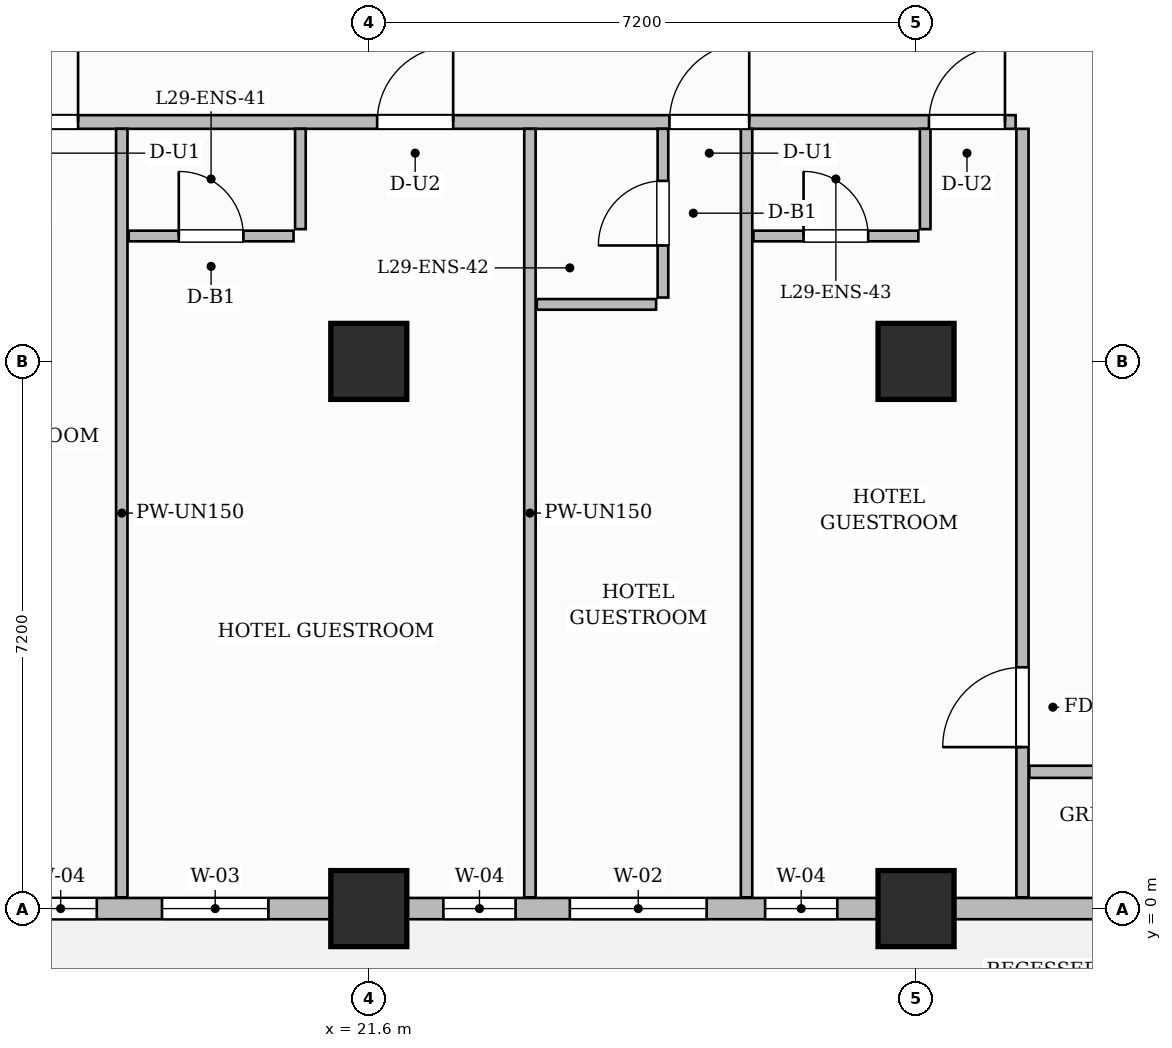
"""IFC4 building model, lengths in metres.
Left out: names, types, materials, properties, quantities, classifications, styles, units other than length and angle.
Written with IfcOpenShell. Run it as: python <this file> out.ifc"""

import sys

from ifc_helpers import new_model, si_unit, direction, frame, frame_2d, origin, origin_2d, place, context, subcontext, project, spatial, rectangle, extrude, source, transform, mapped, element, fill, save


model = new_model("IFC4")
c1 = context("Model", 3, precision=1e-05, world=origin(), true_north=direction((0.0, 1.0)))
c2 = subcontext(c1, "Body", "Model", "MODEL_VIEW")
j1 = project(units=[si_unit("LENGTHUNIT", "METRE"), si_unit("PLANEANGLEUNIT", "RADIAN")], contexts=[c1])
p1 = place(None, origin())
s1 = spatial("IfcSite", under=j1, at=p1, CompositionType="ELEMENT")
p2 = place(p1, origin())
s2 = spatial("IfcBuilding", under=s1, at=p2, CompositionType="ELEMENT")
p3 = place(p2, frame((0.0, 0.0, 119.2)))
s3 = spatial("IfcBuildingStorey", under=s2, at=p3, CompositionType="ELEMENT", Elevation=119.2)
m1 = source(origin(), c2, "Body", "SweptSolid", [
    extrude(rectangle(XDim=1.0, YDim=1.0, at=origin_2d()), origin(), (0.0, 0.0, 1.0), 3.7),
])
for number, where, z_axis, x_axis in (
    (1, (21.6, 0.0, 0.0), (0.0, 0.0, 1.0), (1.0, 0.0, 0.0)),
    (2, (21.6, 7.2, 0.0), (0.0, 0.0, 1.0), (1.0, 0.0, 0.0)),
    (3, (28.8, 0.0, 0.0), (0.0, 0.0, 1.0), (1.0, 0.0, 0.0)),
    (4, (28.8, 7.2, 0.0), (0.0, 0.0, 1.0), (1.0, 0.0, 0.0)),
):
    element("IfcColumn", number, at=place(p3, frame(where, z_axis=z_axis, x_axis=x_axis)), inside=s3, PredefinedType="COLUMN", context=c2, shape_type="MappedRepresentation", body=[
        mapped(m1, transform((0.0, 0.0, 0.0), scale=1.0)),
    ])
p4 = place(p3, frame((14.548, 10.35, 0.0), z_axis=(0.0, 0.0, 1.0), x_axis=(1.0, 0.0, 0.0)))
e5 = element("IfcWall", 5, at=p4, inside=s3, PredefinedType="PARTITIONING", context=c2, shape_type="SweptSolid", body=[
    extrude(rectangle(XDim=15.562, YDim=0.18, at=frame_2d((7.781, 0.0))), origin(), (0.0, 0.0, 1.0), 3.45),
])
p5 = place(p4, frame((2.177, 0.0, 0.0)))
e6 = element("IfcOpeningElement", 6, at=p5, cuts=e5, PredefinedType="OPENING", context=c2, shape_type="SweptSolid", body=[
    extrude(rectangle(XDim=1.05, YDim=2.25, at=frame_2d((0.525, 1.125))), frame((0.0, 0.1, 0.0), z_axis=(0.0, -1.0, 0.0), x_axis=(1.0, 0.0, 0.0)), (0.0, 0.0, 1.0), 0.2),
])
p6 = place(p4, frame((7.162, 0.0, 0.0)))
e7 = element("IfcOpeningElement", 7, at=p6, cuts=e5, PredefinedType="OPENING", context=c2, shape_type="SweptSolid", body=[
    extrude(rectangle(XDim=1.0, YDim=2.2, at=frame_2d((0.5, 1.1))), frame((0.0, 0.1, 0.0), z_axis=(0.0, -1.0, 0.0), x_axis=(1.0, 0.0, 0.0)), (0.0, 0.0, 1.0), 0.2),
])
p7 = place(p4, frame((11.007, 0.0, 0.0)))
e8 = element("IfcOpeningElement", 8, at=p7, cuts=e5, PredefinedType="OPENING", context=c2, shape_type="SweptSolid", body=[
    extrude(rectangle(XDim=1.05, YDim=2.25, at=frame_2d((0.525, 1.125))), frame((0.0, 0.1, 0.0), z_axis=(0.0, -1.0, 0.0), x_axis=(1.0, 0.0, 0.0)), (0.0, 0.0, 1.0), 0.2),
])
p8 = place(p4, frame((14.422, 0.0, 0.0)))
e9 = element("IfcOpeningElement", 9, at=p8, cuts=e5, PredefinedType="OPENING", context=c2, shape_type="SweptSolid", body=[
    extrude(rectangle(XDim=1.0, YDim=2.2, at=frame_2d((0.5, 1.1))), frame((0.0, 0.1, 0.0), z_axis=(0.0, -1.0, 0.0), x_axis=(1.0, 0.0, 0.0)), (0.0, 0.0, 1.0), 0.2),
])
p9 = place(p3, frame((30.2, 0.148, 0.0), z_axis=(0.0, 0.0, 1.0), x_axis=(0.0, 1.0, 0.0)))
e10 = element("IfcWall", 10, at=p9, inside=s3, PredefinedType="PARTITIONING", context=c2, shape_type="SweptSolid", body=[
    extrude(rectangle(XDim=10.112, YDim=0.16, at=frame_2d((5.056, 0.0))), origin(), (0.0, 0.0, 1.0), 3.45),
])
p10 = place(p9, frame((1.977, 0.0, 0.0)))
e11 = element("IfcOpeningElement", 11, at=p10, cuts=e10, PredefinedType="OPENING", context=c2, shape_type="SweptSolid", body=[
    extrude(rectangle(XDim=1.05, YDim=2.15, at=frame_2d((0.525, 1.075))), frame((0.0, 0.09, 0.0), z_axis=(0.0, -1.0, 0.0), x_axis=(1.0, 0.0, 0.0)), (0.0, 0.0, 1.0), 0.18),
])
p11 = place(p3, frame((30.29, 1.8, 0.0), z_axis=(0.0, 0.0, 1.0), x_axis=(1.0, 0.0, 0.0)))
e12 = element("IfcWall", 12, at=p11, inside=s3, PredefinedType="PARTITIONING", context=c2, shape_type="SweptSolid", body=[
    extrude(rectangle(XDim=19.37, YDim=0.16, at=frame_2d((9.685, 0.0))), origin(), (0.0, 0.0, 1.0), 3.45),
])
p12 = place(p11, frame((9.735, 0.0, 0.0)))
e13 = element("IfcOpeningElement", 13, at=p12, cuts=e12, PredefinedType="OPENING", context=c2, shape_type="SweptSolid", body=[
    extrude(rectangle(XDim=0.95, YDim=2.15, at=frame_2d((0.475, 1.075))), frame((0.0, 0.09, 0.0), z_axis=(0.0, -1.0, 0.0), x_axis=(1.0, 0.0, 0.0)), (0.0, 0.0, 1.0), 0.18),
])
p13 = place(p3, frame((18.35, 0.148, 0.0), z_axis=(0.0, 0.0, 1.0), x_axis=(0.0, 1.0, 0.0)))
e14 = element("IfcWall", 14, at=p13, inside=s3, PredefinedType="PARTITIONING", context=c2, shape_type="SweptSolid", body=[
    extrude(rectangle(XDim=10.112, YDim=0.15, at=frame_2d((5.056, 0.0))), origin(), (0.0, 0.0, 1.0), 3.45),
])
p14 = place(p3, frame((20.7, 8.94, 0.0), z_axis=(0.0, 0.0, 1.0), x_axis=(0.0, 1.0, 0.0)))
e15 = element("IfcWall", 15, at=p14, inside=s3, PredefinedType="PARTITIONING", context=c2, shape_type="SweptSolid", body=[
    extrude(rectangle(XDim=1.32, YDim=0.14, at=frame_2d((0.66, 0.0))), origin(), (0.0, 0.0, 1.0), 3.45),
])
p15 = place(p3, frame((18.44, 8.85, 0.0), z_axis=(0.0, 0.0, 1.0), x_axis=(1.0, 0.0, 0.0)))
e16 = element("IfcWall", 16, at=p15, inside=s3, PredefinedType="PARTITIONING", context=c2, shape_type="SweptSolid", body=[
    extrude(rectangle(XDim=2.17, YDim=0.14, at=frame_2d((1.085, 0.0))), origin(), (0.0, 0.0, 1.0), 3.45),
])
p16 = place(p15, frame((0.66, 0.0, 0.0)))
e17 = element("IfcOpeningElement", 17, at=p16, cuts=e16, PredefinedType="OPENING", context=c2, shape_type="SweptSolid", body=[
    extrude(rectangle(XDim=0.85, YDim=2.1, at=frame_2d((0.425, 1.05))), frame((0.0, 0.08, 0.0), z_axis=(0.0, -1.0, 0.0), x_axis=(1.0, 0.0, 0.0)), (0.0, 0.0, 1.0), 0.16),
])
p17 = place(p3, frame((23.72, 0.148, 0.0), z_axis=(0.0, 0.0, 1.0), x_axis=(0.0, 1.0, 0.0)))
e18 = element("IfcWall", 18, at=p17, inside=s3, PredefinedType="PARTITIONING", context=c2, shape_type="SweptSolid", body=[
    extrude(rectangle(XDim=10.112, YDim=0.15, at=frame_2d((5.056, 0.0))), origin(), (0.0, 0.0, 1.0), 3.45),
])
p18 = place(p3, frame((25.47, 8.04, 0.0), z_axis=(0.0, 0.0, 1.0), x_axis=(0.0, 1.0, 0.0)))
e19 = element("IfcWall", 19, at=p18, inside=s3, PredefinedType="PARTITIONING", context=c2, shape_type="SweptSolid", body=[
    extrude(rectangle(XDim=2.22, YDim=0.14, at=frame_2d((1.11, 0.0))), origin(), (0.0, 0.0, 1.0), 3.45),
])
p19 = place(p18, frame((0.685, 0.0, 0.0)))
e20 = element("IfcOpeningElement", 20, at=p19, cuts=e19, PredefinedType="OPENING", context=c2, shape_type="SweptSolid", body=[
    extrude(rectangle(XDim=0.85, YDim=2.1, at=frame_2d((0.425, 1.05))), frame((0.0, 0.08, 0.0), z_axis=(0.0, -1.0, 0.0), x_axis=(1.0, 0.0, 0.0)), (0.0, 0.0, 1.0), 0.16),
])
p20 = place(p3, frame((23.81, 7.95, 0.0), z_axis=(0.0, 0.0, 1.0), x_axis=(1.0, 0.0, 0.0)))
e21 = element("IfcWall", 21, at=p20, inside=s3, PredefinedType="PARTITIONING", context=c2, shape_type="SweptSolid", body=[
    extrude(rectangle(XDim=1.57, YDim=0.14, at=frame_2d((0.785, 0.0))), origin(), (0.0, 0.0, 1.0), 3.45),
])
p21 = place(p3, frame((26.57, 0.148, 0.0), z_axis=(0.0, 0.0, 1.0), x_axis=(0.0, 1.0, 0.0)))
e22 = element("IfcWall", 22, at=p21, inside=s3, PredefinedType="PARTITIONING", context=c2, shape_type="SweptSolid", body=[
    extrude(rectangle(XDim=10.112, YDim=0.15, at=frame_2d((5.056, 0.0))), origin(), (0.0, 0.0, 1.0), 3.45),
])
p22 = place(p3, frame((28.92, 8.94, 0.0), z_axis=(0.0, 0.0, 1.0), x_axis=(0.0, 1.0, 0.0)))
e23 = element("IfcWall", 23, at=p22, inside=s3, PredefinedType="PARTITIONING", context=c2, shape_type="SweptSolid", body=[
    extrude(rectangle(XDim=1.32, YDim=0.14, at=frame_2d((0.66, 0.0))), origin(), (0.0, 0.0, 1.0), 2.935),
])
p23 = place(p3, frame((26.66, 8.85, 0.0), z_axis=(0.0, 0.0, 1.0), x_axis=(1.0, 0.0, 0.0)))
e24 = element("IfcWall", 24, at=p23, inside=s3, PredefinedType="PARTITIONING", context=c2, shape_type="SweptSolid", body=[
    extrude(rectangle(XDim=2.17, YDim=0.14, at=frame_2d((1.085, 0.0))), origin(), (0.0, 0.0, 1.0), 3.45),
])
p24 = place(p23, frame((0.66, 0.0, 0.0)))
e25 = element("IfcOpeningElement", 25, at=p24, cuts=e24, PredefinedType="OPENING", context=c2, shape_type="SweptSolid", body=[
    extrude(rectangle(XDim=0.85, YDim=2.1, at=frame_2d((0.425, 1.05))), frame((0.0, 0.08, 0.0), z_axis=(0.0, -1.0, 0.0), x_axis=(1.0, 0.0, 0.0)), (0.0, 0.0, 1.0), 0.16),
])
p25 = place(p3, frame((14.4, 0.0, 0.0), z_axis=(0.0, 0.0, 1.0), x_axis=(1.0, 0.0, 0.0)))
e26 = element("IfcWall", 26, at=p25, inside=s3, PredefinedType="SOLIDWALL", context=c2, shape_type="SweptSolid", body=[
    extrude(rectangle(XDim=35.4, YDim=0.28, at=frame_2d((17.7, 0.0))), origin(), (0.0, 0.0, 1.0), 2.935),
])
p26 = place(p25, frame((0.85, 0.0, 0.0)))
e27 = element("IfcOpeningElement", 27, at=p26, cuts=e26, PredefinedType="OPENING", context=c2, shape_type="SweptSolid", body=[
    extrude(rectangle(XDim=1.2, YDim=2.2, at=frame_2d((0.6, 1.1))), frame((0.0, 0.15, 0.0), z_axis=(0.0, -1.0, 0.0), x_axis=(1.0, 0.0, 0.0)), (0.0, 0.0, 1.0), 0.3),
])
p27 = place(p25, frame((2.671, 0.0, 0.8)))
e28 = element("IfcOpeningElement", 28, at=p27, cuts=e26, PredefinedType="OPENING", context=c2, shape_type="SweptSolid", body=[
    extrude(rectangle(XDim=0.95, YDim=1.75, at=frame_2d((0.475, 0.875))), frame((0.0, 0.15, 0.0), z_axis=(0.0, -1.0, 0.0), x_axis=(1.0, 0.0, 0.0)), (0.0, 0.0, 1.0), 0.3),
])
p28 = place(p25, frame((4.479, 0.0, 0.8)))
e29 = element("IfcOpeningElement", 29, at=p28, cuts=e26, PredefinedType="OPENING", context=c2, shape_type="SweptSolid", body=[
    extrude(rectangle(XDim=1.4, YDim=1.85, at=frame_2d((0.7, 0.925))), frame((0.0, 0.15, 0.0), z_axis=(0.0, -1.0, 0.0), x_axis=(1.0, 0.0, 0.0)), (0.0, 0.0, 1.0), 0.3),
])
p29 = place(p25, frame((8.181, 0.0, 0.8)))
e30 = element("IfcOpeningElement", 30, at=p29, cuts=e26, PredefinedType="OPENING", context=c2, shape_type="SweptSolid", body=[
    extrude(rectangle(XDim=0.95, YDim=1.75, at=frame_2d((0.475, 0.875))), frame((0.0, 0.15, 0.0), z_axis=(0.0, -1.0, 0.0), x_axis=(1.0, 0.0, 0.0)), (0.0, 0.0, 1.0), 0.3),
])
p30 = place(p25, frame((9.845, 0.0, 0.8)))
e31 = element("IfcOpeningElement", 31, at=p30, cuts=e26, PredefinedType="OPENING", context=c2, shape_type="SweptSolid", body=[
    extrude(rectangle(XDim=1.8, YDim=1.85, at=frame_2d((0.9, 0.925))), frame((0.0, 0.15, 0.0), z_axis=(0.0, -1.0, 0.0), x_axis=(1.0, 0.0, 0.0)), (0.0, 0.0, 1.0), 0.3),
])
p31 = place(p25, frame((12.414, 0.0, 0.8)))
e32 = element("IfcOpeningElement", 32, at=p31, cuts=e26, PredefinedType="OPENING", context=c2, shape_type="SweptSolid", body=[
    extrude(rectangle(XDim=0.95, YDim=1.75, at=frame_2d((0.475, 0.875))), frame((0.0, 0.15, 0.0), z_axis=(0.0, -1.0, 0.0), x_axis=(1.0, 0.0, 0.0)), (0.0, 0.0, 1.0), 0.3),
])
p32 = place(p25, frame((16.804, 0.0, 0.8)))
e33 = element("IfcOpeningElement", 33, at=p32, cuts=e26, PredefinedType="OPENING", context=c2, shape_type="SweptSolid", body=[
    extrude(rectangle(XDim=1.8, YDim=1.85, at=frame_2d((0.9, 0.925))), frame((0.0, 0.15, 0.0), z_axis=(0.0, -1.0, 0.0), x_axis=(1.0, 0.0, 0.0)), (0.0, 0.0, 1.0), 0.3),
])
p33 = place(p25, frame((21.725, 0.0, 0.8)))
e34 = element("IfcOpeningElement", 34, at=p33, cuts=e26, PredefinedType="OPENING", context=c2, shape_type="SweptSolid", body=[
    extrude(rectangle(XDim=1.8, YDim=1.85, at=frame_2d((0.9, 0.925))), frame((0.0, 0.15, 0.0), z_axis=(0.0, -1.0, 0.0), x_axis=(1.0, 0.0, 0.0)), (0.0, 0.0, 1.0), 0.3),
])
p34 = place(p25, frame((24.475, 0.0, 0.8)))
e35 = element("IfcOpeningElement", 35, at=p34, cuts=e26, PredefinedType="OPENING", context=c2, shape_type="SweptSolid", body=[
    extrude(rectangle(XDim=1.8, YDim=1.85, at=frame_2d((0.9, 0.925))), frame((0.0, 0.15, 0.0), z_axis=(0.0, -1.0, 0.0), x_axis=(1.0, 0.0, 0.0)), (0.0, 0.0, 1.0), 0.3),
])
p35 = place(p25, frame((29.075, 0.0, 0.8)))
e36 = element("IfcOpeningElement", 36, at=p35, cuts=e26, PredefinedType="OPENING", context=c2, shape_type="SweptSolid", body=[
    extrude(rectangle(XDim=1.8, YDim=1.85, at=frame_2d((0.9, 0.925))), frame((0.0, 0.15, 0.0), z_axis=(0.0, -1.0, 0.0), x_axis=(1.0, 0.0, 0.0)), (0.0, 0.0, 1.0), 0.3),
])
p36 = place(p25, frame((32.125, 0.0, 0.8)))
e37 = element("IfcOpeningElement", 37, at=p36, cuts=e26, PredefinedType="OPENING", context=c2, shape_type="SweptSolid", body=[
    extrude(rectangle(XDim=1.8, YDim=1.85, at=frame_2d((0.9, 0.925))), frame((0.0, 0.15, 0.0), z_axis=(0.0, -1.0, 0.0), x_axis=(1.0, 0.0, 0.0)), (0.0, 0.0, 1.0), 0.3),
])
m2 = source(origin(), c2, "Body", "SweptSolid", [
    extrude(rectangle(XDim=1.05, YDim=2.15, at=frame_2d((0.525, 1.075))), frame((0.0, 0.025, 0.0), z_axis=(0.0, -1.0, 0.0), x_axis=(1.0, 0.0, 0.0)), (0.0, 0.0, 1.0), 0.05),
])
p37 = place(p10, origin())
e38 = element("IfcDoor", 38, at=p37, inside=s3, OperationType="SINGLE_SWING_LEFT", PredefinedType="DOOR", context=c2, shape_type="MappedRepresentation", body=[
    mapped(m2, transform((0.0, 0.0, 0.0), scale=1.0)),
])
fill(e11, e38)
m3 = source(origin(), c2, "Body", "SweptSolid", [
    extrude(rectangle(XDim=1.05, YDim=2.25, at=frame_2d((0.525, 1.125))), frame((0.0, 0.025, 0.0), z_axis=(0.0, -1.0, 0.0), x_axis=(1.0, 0.0, 0.0)), (0.0, 0.0, 1.0), 0.05),
])
p38 = place(p5, origin())
e39 = element("IfcDoor", 39, at=p38, inside=s3, OperationType="SINGLE_SWING_RIGHT", PredefinedType="DOOR", context=c2, shape_type="MappedRepresentation", body=[
    mapped(m3, transform((0.0, 0.0, 0.0), scale=1.0)),
])
fill(e6, e39)
m4 = source(origin(), c2, "Body", "SweptSolid", [
    extrude(rectangle(XDim=0.85, YDim=2.1, at=frame_2d((0.425, 1.05))), frame((0.0, 0.025, 0.0), z_axis=(0.0, -1.0, 0.0), x_axis=(1.0, 0.0, 0.0)), (0.0, 0.0, 1.0), 0.05),
])
p39 = place(p16, origin())
e40 = element("IfcDoor", 40, at=p39, inside=s3, OperationType="SINGLE_SWING_LEFT", PredefinedType="DOOR", context=c2, shape_type="MappedRepresentation", body=[
    mapped(m4, transform((0.0, 0.0, 0.0), scale=1.0)),
])
fill(e17, e40)
m5 = source(origin(), c2, "Body", "SweptSolid", [
    extrude(rectangle(XDim=1.0, YDim=2.2, at=frame_2d((0.5, 1.1))), frame((0.0, 0.025, 0.0), z_axis=(0.0, -1.0, 0.0), x_axis=(1.0, 0.0, 0.0)), (0.0, 0.0, 1.0), 0.05),
])
p40 = place(p6, origin())
e41 = element("IfcDoor", 41, at=p40, inside=s3, OperationType="SINGLE_SWING_RIGHT", PredefinedType="DOOR", context=c2, shape_type="MappedRepresentation", body=[
    mapped(m5, transform((0.0, 0.0, 0.0), scale=1.0)),
])
fill(e7, e41)
p41 = place(p19, origin())
e42 = element("IfcDoor", 42, at=p41, inside=s3, OperationType="SINGLE_SWING_LEFT", PredefinedType="DOOR", context=c2, shape_type="MappedRepresentation", body=[
    mapped(m4, transform((0.0, 0.0, 0.0), scale=1.0)),
])
fill(e20, e42)
p42 = place(p7, origin())
e43 = element("IfcDoor", 43, at=p42, inside=s3, OperationType="SINGLE_SWING_RIGHT", PredefinedType="DOOR", context=c2, shape_type="MappedRepresentation", body=[
    mapped(m3, transform((0.0, 0.0, 0.0), scale=1.0)),
])
fill(e8, e43)
p43 = place(p24, origin())
e44 = element("IfcDoor", 44, at=p43, inside=s3, OperationType="SINGLE_SWING_LEFT", PredefinedType="DOOR", context=c2, shape_type="MappedRepresentation", body=[
    mapped(m4, transform((0.0, 0.0, 0.0), scale=1.0)),
])
fill(e25, e44)
p44 = place(p8, origin())
e45 = element("IfcDoor", 45, at=p44, inside=s3, OperationType="SINGLE_SWING_RIGHT", PredefinedType="DOOR", context=c2, shape_type="MappedRepresentation", body=[
    mapped(m5, transform((0.0, 0.0, 0.0), scale=1.0)),
])
fill(e9, e45)
m6 = source(origin(), c2, "Body", "SweptSolid", [
    extrude(rectangle(XDim=0.95, YDim=1.75, at=frame_2d((0.475, 0.875))), frame((0.0, 0.03, 0.0), z_axis=(0.0, -1.0, 0.0), x_axis=(1.0, 0.0, 0.0)), (0.0, 0.0, 1.0), 0.06),
])
p45 = place(p27, origin())
e46 = element("IfcWindow", 46, at=p45, inside=s3, PartitioningType="SINGLE_PANEL", PredefinedType="WINDOW", context=c2, shape_type="MappedRepresentation", body=[
    mapped(m6, transform((0.0, 0.0, 0.0), scale=1.0)),
])
fill(e28, e46)
m7 = source(origin(), c2, "Body", "SweptSolid", [
    extrude(rectangle(XDim=1.4, YDim=1.85, at=frame_2d((0.7, 0.925))), frame((0.0, 0.03, 0.0), z_axis=(0.0, -1.0, 0.0), x_axis=(1.0, 0.0, 0.0)), (0.0, 0.0, 1.0), 0.06),
])
p46 = place(p28, origin())
e47 = element("IfcWindow", 47, at=p46, inside=s3, PartitioningType="SINGLE_PANEL", PredefinedType="WINDOW", context=c2, shape_type="MappedRepresentation", body=[
    mapped(m7, transform((0.0, 0.0, 0.0), scale=1.0)),
])
fill(e29, e47)
p47 = place(p29, origin())
e48 = element("IfcWindow", 48, at=p47, inside=s3, PartitioningType="SINGLE_PANEL", PredefinedType="WINDOW", context=c2, shape_type="MappedRepresentation", body=[
    mapped(m6, transform((0.0, 0.0, 0.0), scale=1.0)),
])
fill(e30, e48)
m8 = source(origin(), c2, "Body", "SweptSolid", [
    extrude(rectangle(XDim=1.8, YDim=1.85, at=frame_2d((0.9, 0.925))), frame((0.0, 0.03, 0.0), z_axis=(0.0, -1.0, 0.0), x_axis=(1.0, 0.0, 0.0)), (0.0, 0.0, 1.0), 0.06),
])
p48 = place(p30, origin())
e49 = element("IfcWindow", 49, at=p48, inside=s3, PartitioningType="DOUBLE_PANEL_VERTICAL", PredefinedType="WINDOW", context=c2, shape_type="MappedRepresentation", body=[
    mapped(m8, transform((0.0, 0.0, 0.0), scale=1.0)),
])
fill(e31, e49)
p49 = place(p31, origin())
e50 = element("IfcWindow", 50, at=p49, inside=s3, PartitioningType="SINGLE_PANEL", PredefinedType="WINDOW", context=c2, shape_type="MappedRepresentation", body=[
    mapped(m6, transform((0.0, 0.0, 0.0), scale=1.0)),
])
fill(e32, e50)
save(model, sys.argv[1])
